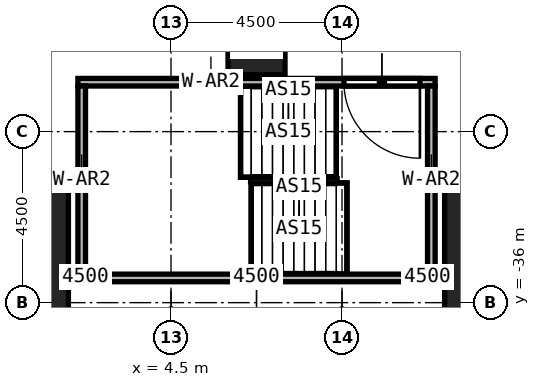
"""IFC4 building model, lengths in metres.
Left out: names, types, materials, properties, quantities, classifications, styles, units other than length and angle.
Written with IfcOpenShell. Run it as: python <this file> out.ifc"""

import sys

from ifc_helpers import new_model, si_unit, direction, frame, frame_2d, origin, origin_2d, place, context, subcontext, project, spatial, rectangle, extrude, element, fill, save


model = new_model("IFC4")
c1 = context("Model", 3, precision=1e-05, world=origin(), true_north=direction((0.0, 1.0)))
c2 = subcontext(c1, "Body", "Model", "MODEL_VIEW")
j1 = project(units=[si_unit("LENGTHUNIT", "METRE"), si_unit("PLANEANGLEUNIT", "RADIAN")], contexts=[c1])
p1 = place(None, origin())
s1 = spatial("IfcSite", under=j1, at=p1, CompositionType="ELEMENT")
p2 = place(p1, origin())
s2 = spatial("IfcBuilding", under=s1, at=p2, CompositionType="ELEMENT")
p3 = place(p2, frame((0.0, 0.0, 25.0)))
s3 = spatial("IfcBuildingStorey", under=s2, at=p3, CompositionType="ELEMENT", Elevation=25.0)
for number, where, z_axis, x_axis in (
    (1, (0.0, -36.0, 0.0), (0.0, 0.0, 1.0), (1.0, 0.0, 0.0)),
    (2, (13.5, -36.0, 0.0), (0.0, 0.0, 1.0), (1.0, 0.0, 0.0)),
):
    element("IfcColumn", number, at=place(p3, frame(where, z_axis=z_axis, x_axis=x_axis)), inside=s3, PredefinedType="COLUMN", context=c2, shape_type="SweptSolid", body=[
        extrude(rectangle(XDim=3.6, YDim=6.0, at=origin_2d()), origin(), (0.0, 0.0, 1.0), 6.0),
    ])
p4 = place(p3, frame((6.75, -29.25, 0.0), z_axis=(0.0, 0.0, 1.0), x_axis=(1.0, 0.0, 0.0)))
e3 = element("IfcColumn", 3, at=p4, inside=s3, PredefinedType="COLUMN", context=c2, shape_type="SweptSolid", body=[
    extrude(rectangle(XDim=1.5, YDim=1.5, at=origin_2d()), origin(), (0.0, 0.0, 1.0), 6.0),
])
p5 = place(p3, frame((11.45, -30.2, 0.0), z_axis=(0.0, 0.0, 1.0), x_axis=(-1.0, 0.0, 0.0)))
e4 = element("IfcWall", 4, at=p5, inside=s3, PredefinedType="SOLIDWALL", context=c2, shape_type="SweptSolid", body=[
    extrude(rectangle(XDim=9.4, YDim=0.2, at=frame_2d((4.7, 0.0))), origin(), (0.0, 0.0, 1.0), 6.0),
])
p6 = place(p5, frame((0.4, 0.0, 0.0)))
e5 = element("IfcOpeningElement", 5, at=p6, cuts=e4, PredefinedType="OPENING", context=c2, shape_type="SweptSolid", body=[
    extrude(rectangle(XDim=2.0, YDim=2.4, at=frame_2d((1.0, 1.2))), frame((0.0, 0.1, 0.0), z_axis=(0.0, -1.0, 0.0), x_axis=(1.0, 0.0, 0.0)), (0.0, 0.0, 1.0), 0.2),
])
p7 = place(p3, frame((2.05, -35.35, 0.0), z_axis=(0.0, 0.0, 1.0), x_axis=(1.0, 0.0, 0.0)))
e6 = element("IfcWall", 6, at=p7, inside=s3, PredefinedType="SOLIDWALL", context=c2, shape_type="SweptSolid", body=[
    extrude(rectangle(XDim=9.4, YDim=0.2, at=frame_2d((4.7, 0.0))), origin(), (0.0, 0.0, 1.0), 6.0),
])
for number, where, z_axis, x_axis in (
    (7, (2.15, -35.25, 0.0), (0.0, 0.0, 1.0), (0.0, 1.0, 0.0)),
    (8, (11.35, -35.25, 0.0), (0.0, 0.0, 1.0), (0.0, 1.0, 0.0)),
):
    element("IfcWall", number, at=place(p3, frame(where, z_axis=z_axis, x_axis=x_axis)), inside=s3, PredefinedType="SOLIDWALL", context=c2, shape_type="SweptSolid", body=[
        extrude(rectangle(XDim=4.95, YDim=0.2, at=frame_2d((2.475, 0.0))), origin(), (0.0, 0.0, 1.0), 6.0),
    ])
p8 = place(p6, origin())
e9 = element("IfcDoor", 9, at=p8, inside=s3, OperationType="DOUBLE_DOOR_SINGLE_SWING", PredefinedType="DOOR", context=c2, shape_type="SweptSolid", body=[
    extrude(rectangle(XDim=2.0, YDim=2.4, at=frame_2d((1.0, 1.2))), frame((0.0, 0.025, 0.0), z_axis=(0.0, -1.0, 0.0), x_axis=(1.0, 0.0, 0.0)), (0.0, 0.0, 1.0), 0.05),
])
fill(e5, e9)
save(model, sys.argv[1])
